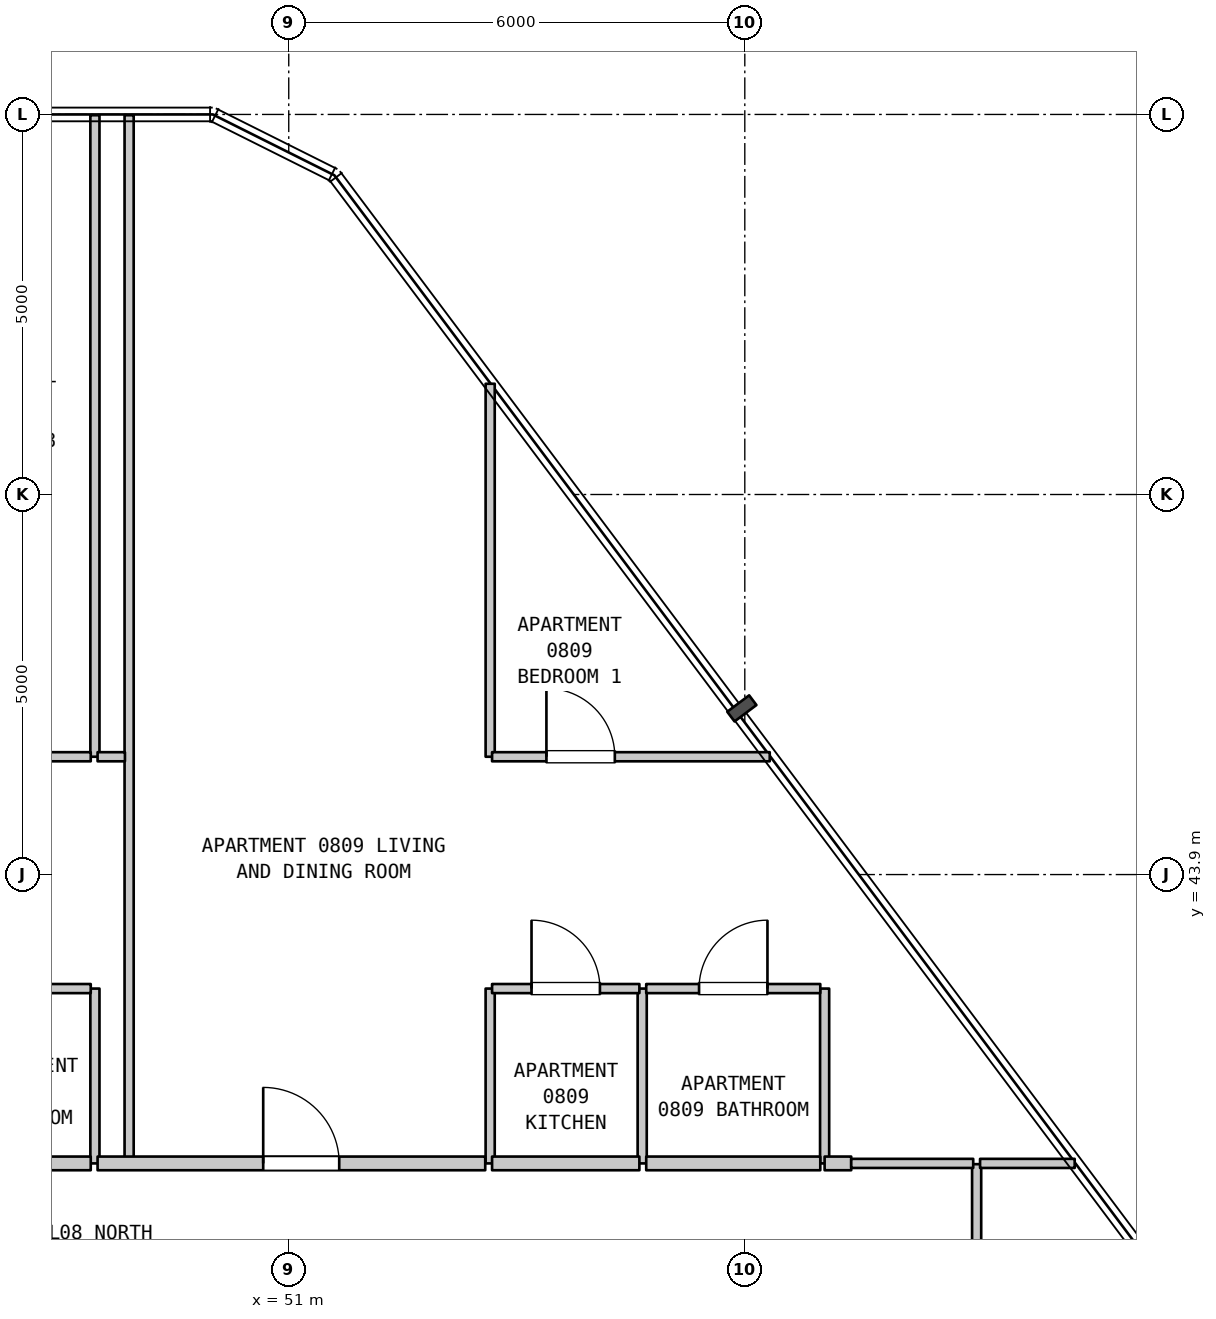
"""IFC4 building model, lengths in metres.
Left out: names, types, materials, properties, quantities, classifications, styles, units other than length and angle.
Written with IfcOpenShell. Run it as: python <this file> out.ifc"""

import sys

from ifc_helpers import new_model, si_unit, direction, frame, frame_2d, origin, place, context, subcontext, project, spatial, rectangle, extrude, element, fill, save


model = new_model("IFC4")
c1 = context("Model", 3, precision=1e-05, world=origin(), true_north=direction((0.0, 1.0)))
c2 = subcontext(c1, "Body", "Model", "MODEL_VIEW")
j1 = project(units=[si_unit("LENGTHUNIT", "METRE"), si_unit("PLANEANGLEUNIT", "RADIAN")], contexts=[c1])
p1 = place(None, origin())
s1 = spatial("IfcSite", under=j1, at=p1, CompositionType="ELEMENT")
p2 = place(p1, origin())
s2 = spatial("IfcBuilding", under=s1, at=p2, CompositionType="ELEMENT")
p3 = place(p2, frame((0.0, 0.0, 38.8)))
s3 = spatial("IfcBuildingStorey", under=s2, at=p3, CompositionType="ELEMENT", Elevation=38.8)
p4 = place(p3, frame((48.45, 40.1, 0.0), z_axis=(0.0, 0.0, 1.0), x_axis=(0.0, 1.0, 0.0)))
e1 = element("IfcWall", 1, at=p4, inside=s3, PredefinedType="PARTITIONING", context=c2, shape_type="SweptSolid", body=[
    extrude(rectangle(XDim=2.3, YDim=0.12, at=frame_2d((1.15, 0.0))), origin(), (0.0, 0.0, 1.0), 3.385),
])
p5 = place(p3, frame((48.45, 45.45, 0.0), z_axis=(0.0, 0.0, 1.0), x_axis=(0.0, 1.0, 0.0)))
e2 = element("IfcWall", 2, at=p5, inside=s3, PredefinedType="PARTITIONING", context=c2, shape_type="SweptSolid", body=[
    extrude(rectangle(XDim=8.44, YDim=0.12, at=frame_2d((4.22, 0.0))), origin(), (0.0, 0.0, 1.0), 3.385),
])
p6 = place(p3, frame((48.9, 40.1, 0.0), z_axis=(0.0, 0.0, 1.0), x_axis=(0.0, 1.0, 0.0)))
e3 = element("IfcWall", 3, at=p6, inside=s3, PredefinedType="PARTITIONING", context=c2, shape_type="SweptSolid", body=[
    extrude(rectangle(XDim=13.79, YDim=0.12, at=frame_2d((6.895, 0.0))), origin(), (0.0, 0.0, 1.0), 3.385),
])
p7 = place(p3, frame((53.65, 40.1, 0.0), z_axis=(0.0, 0.0, 1.0), x_axis=(0.0, 1.0, 0.0)))
e4 = element("IfcWall", 4, at=p7, inside=s3, PredefinedType="PARTITIONING", context=c2, shape_type="SweptSolid", body=[
    extrude(rectangle(XDim=2.3, YDim=0.12, at=frame_2d((1.15, 0.0))), origin(), (0.0, 0.0, 1.0), 3.385),
])
p8 = place(p3, frame((53.65, 45.45, 0.0), z_axis=(0.0, 0.0, 1.0), x_axis=(0.0, 1.0, 0.0)))
e5 = element("IfcWall", 5, at=p8, inside=s3, PredefinedType="PARTITIONING", context=c2, shape_type="SweptSolid", body=[
    extrude(rectangle(XDim=4.907, YDim=0.12, at=frame_2d((2.454, 0.0))), origin(), (0.0, 0.0, 1.0), 3.385),
])
for number, where, z_axis, x_axis in (
    (6, (55.65, 40.1, 0.0), (0.0, 0.0, 1.0), (0.0, 1.0, 0.0)),
    (7, (58.05, 40.1, 0.0), (0.0, 0.0, 1.0), (0.0, 1.0, 0.0)),
):
    element("IfcWall", number, at=place(p3, frame(where, z_axis=z_axis, x_axis=x_axis)), inside=s3, PredefinedType="PARTITIONING", context=c2, shape_type="SweptSolid", body=[
        extrude(rectangle(XDim=2.3, YDim=0.12, at=frame_2d((1.15, 0.0))), origin(), (0.0, 0.0, 1.0), 3.385),
    ])
p9 = place(p3, frame((60.05, 37.89, 0.0), z_axis=(0.0, 0.0, 1.0), x_axis=(0.0, 1.0, 0.0)))
e8 = element("IfcWall", 8, at=p9, inside=s3, PredefinedType="PARTITIONING", context=c2, shape_type="SweptSolid", body=[
    extrude(rectangle(XDim=2.2, YDim=0.12, at=frame_2d((1.1, 0.0))), origin(), (0.0, 0.0, 1.0), 3.385),
])
p10 = place(p3, frame((44.635, 40.1, 0.0), z_axis=(0.0, 0.0, 1.0), x_axis=(1.0, 0.0, 0.0)))
e9 = element("IfcWall", 9, at=p10, inside=s3, PredefinedType="STANDARD", context=c2, shape_type="SweptSolid", body=[
    extrude(rectangle(XDim=3.76, YDim=0.18, at=frame_2d((1.88, 0.0))), origin(), (0.0, 0.0, 1.0), 3.385),
])
p11 = place(p3, frame((48.485, 40.1, 0.0), z_axis=(0.0, 0.0, 1.0), x_axis=(1.0, 0.0, 0.0)))
e10 = element("IfcWall", 10, at=p11, inside=s3, PredefinedType="STANDARD", context=c2, shape_type="SweptSolid", body=[
    extrude(rectangle(XDim=5.1, YDim=0.18, at=frame_2d((2.55, 0.0))), origin(), (0.0, 0.0, 1.0), 3.385),
])
p12 = place(p11, frame((2.179, 0.0, 0.0)))
e11 = element("IfcOpeningElement", 11, at=p12, cuts=e10, PredefinedType="OPENING", context=c2, shape_type="SweptSolid", body=[
    extrude(rectangle(XDim=1.0, YDim=2.15, at=frame_2d((0.5, 1.075))), frame((0.0, 0.1, 0.0), z_axis=(0.0, -1.0, 0.0), x_axis=(1.0, 0.0, 0.0)), (0.0, 0.0, 1.0), 0.2),
])
p13 = place(p3, frame((53.675, 40.1, 0.0), z_axis=(0.0, 0.0, 1.0), x_axis=(1.0, 0.0, 0.0)))
e12 = element("IfcWall", 12, at=p13, inside=s3, PredefinedType="STANDARD", context=c2, shape_type="SweptSolid", body=[
    extrude(rectangle(XDim=1.938, YDim=0.18, at=frame_2d((0.969, 0.0))), origin(), (0.0, 0.0, 1.0), 3.385),
])
p14 = place(p3, frame((55.703, 40.1, 0.0), z_axis=(0.0, 0.0, 1.0), x_axis=(1.0, 0.0, 0.0)))
e13 = element("IfcWall", 13, at=p14, inside=s3, PredefinedType="STANDARD", context=c2, shape_type="SweptSolid", body=[
    extrude(rectangle(XDim=2.29, YDim=0.18, at=frame_2d((1.145, 0.0))), origin(), (0.0, 0.0, 1.0), 3.385),
])
p15 = place(p3, frame((58.05, 40.1, 0.0), z_axis=(0.0, 0.0, 1.0), x_axis=(1.0, 0.0, 0.0)))
e14 = element("IfcWall", 14, at=p15, inside=s3, PredefinedType="STANDARD", context=c2, shape_type="SweptSolid", body=[
    extrude(rectangle(XDim=0.35, YDim=0.18, at=frame_2d((0.175, 0.0))), origin(), (0.0, 0.0, 1.0), 3.385),
])
p16 = place(p3, frame((58.4, 40.1, 0.0), z_axis=(0.0, 0.0, 1.0), x_axis=(1.0, 0.0, 0.0)))
e15 = element("IfcWall", 15, at=p16, inside=s3, PredefinedType="PARTITIONING", context=c2, shape_type="SweptSolid", body=[
    extrude(rectangle(XDim=1.605, YDim=0.12, at=frame_2d((0.802, 0.0))), origin(), (0.0, 0.0, 1.0), 3.385),
])
p17 = place(p3, frame((60.095, 40.1, 0.0), z_axis=(0.0, 0.0, 1.0), x_axis=(1.0, 0.0, 0.0)))
e16 = element("IfcWall", 16, at=p17, inside=s3, PredefinedType="PARTITIONING", context=c2, shape_type="SweptSolid", body=[
    extrude(rectangle(XDim=1.245, YDim=0.12, at=frame_2d((0.623, 0.0))), origin(), (0.0, 0.0, 1.0), 3.385),
])
p18 = place(p3, frame((44.635, 42.4, 0.0), z_axis=(0.0, 0.0, 1.0), x_axis=(1.0, 0.0, 0.0)))
e17 = element("IfcWall", 17, at=p18, inside=s3, PredefinedType="PARTITIONING", context=c2, shape_type="SweptSolid", body=[
    extrude(rectangle(XDim=3.76, YDim=0.12, at=frame_2d((1.88, 0.0))), origin(), (0.0, 0.0, 1.0), 3.385),
])
p19 = place(p18, frame((1.358, 0.0, 0.0)))
e18 = element("IfcOpeningElement", 18, at=p19, cuts=e17, PredefinedType="OPENING", context=c2, shape_type="SweptSolid", body=[
    extrude(rectangle(XDim=0.9, YDim=2.1, at=frame_2d((0.45, 1.05))), frame((0.0, 0.07, 0.0), z_axis=(0.0, -1.0, 0.0), x_axis=(1.0, 0.0, 0.0)), (0.0, 0.0, 1.0), 0.14),
])
p20 = place(p3, frame((53.675, 42.4, 0.0), z_axis=(0.0, 0.0, 1.0), x_axis=(1.0, 0.0, 0.0)))
e19 = element("IfcWall", 19, at=p20, inside=s3, PredefinedType="PARTITIONING", context=c2, shape_type="SweptSolid", body=[
    extrude(rectangle(XDim=1.938, YDim=0.12, at=frame_2d((0.969, 0.0))), origin(), (0.0, 0.0, 1.0), 3.385),
])
p21 = place(p20, frame((0.519, 0.0, 0.0)))
e20 = element("IfcOpeningElement", 20, at=p21, cuts=e19, PredefinedType="OPENING", context=c2, shape_type="SweptSolid", body=[
    extrude(rectangle(XDim=0.9, YDim=2.15, at=frame_2d((0.45, 1.075))), frame((0.0, 0.07, 0.0), z_axis=(0.0, -1.0, 0.0), x_axis=(1.0, 0.0, 0.0)), (0.0, 0.0, 1.0), 0.14),
])
p22 = place(p3, frame((55.703, 42.4, 0.0), z_axis=(0.0, 0.0, 1.0), x_axis=(1.0, 0.0, 0.0)))
e21 = element("IfcWall", 21, at=p22, inside=s3, PredefinedType="PARTITIONING", context=c2, shape_type="SweptSolid", body=[
    extrude(rectangle(XDim=2.29, YDim=0.12, at=frame_2d((1.145, 0.0))), origin(), (0.0, 0.0, 1.0), 3.385),
])
p23 = place(p22, frame((0.695, 0.0, 0.0)))
e22 = element("IfcOpeningElement", 22, at=p23, cuts=e21, PredefinedType="OPENING", context=c2, shape_type="SweptSolid", body=[
    extrude(rectangle(XDim=0.9, YDim=2.1, at=frame_2d((0.45, 1.05))), frame((0.0, 0.07, 0.0), z_axis=(0.0, -1.0, 0.0), x_axis=(1.0, 0.0, 0.0)), (0.0, 0.0, 1.0), 0.14),
])
p24 = place(p3, frame((41.355, 45.45, 0.0), z_axis=(0.0, 0.0, 1.0), x_axis=(1.0, 0.0, 0.0)))
e23 = element("IfcWall", 23, at=p24, inside=s3, PredefinedType="PARTITIONING", context=c2, shape_type="SweptSolid", body=[
    extrude(rectangle(XDim=7.04, YDim=0.12, at=frame_2d((3.52, 0.0))), origin(), (0.0, 0.0, 1.0), 3.385),
])
p25 = place(p24, frame((0.868, 0.0, 0.0)))
e24 = element("IfcOpeningElement", 24, at=p25, cuts=e23, PredefinedType="OPENING", context=c2, shape_type="SweptSolid", body=[
    extrude(rectangle(XDim=0.9, YDim=2.15, at=frame_2d((0.45, 1.075))), frame((0.0, 0.07, 0.0), z_axis=(0.0, -1.0, 0.0), x_axis=(1.0, 0.0, 0.0)), (0.0, 0.0, 1.0), 0.14),
])
p26 = place(p24, frame((2.999, 0.0, 0.0)))
e25 = element("IfcOpeningElement", 25, at=p26, cuts=e23, PredefinedType="OPENING", context=c2, shape_type="SweptSolid", body=[
    extrude(rectangle(XDim=0.9, YDim=2.15, at=frame_2d((0.45, 1.075))), frame((0.0, 0.07, 0.0), z_axis=(0.0, -1.0, 0.0), x_axis=(1.0, 0.0, 0.0)), (0.0, 0.0, 1.0), 0.14),
])
p27 = place(p24, frame((5.272, 0.0, 0.0)))
e26 = element("IfcOpeningElement", 26, at=p27, cuts=e23, PredefinedType="OPENING", context=c2, shape_type="SweptSolid", body=[
    extrude(rectangle(XDim=0.9, YDim=2.15, at=frame_2d((0.45, 1.075))), frame((0.0, 0.07, 0.0), z_axis=(0.0, -1.0, 0.0), x_axis=(1.0, 0.0, 0.0)), (0.0, 0.0, 1.0), 0.14),
])
p28 = place(p3, frame((48.485, 45.45, 0.0), z_axis=(0.0, 0.0, 1.0), x_axis=(1.0, 0.0, 0.0)))
e27 = element("IfcWall", 27, at=p28, inside=s3, PredefinedType="PARTITIONING", context=c2, shape_type="SweptSolid", body=[
    extrude(rectangle(XDim=0.36, YDim=0.12, at=frame_2d((0.18, 0.0))), origin(), (0.0, 0.0, 1.0), 3.385),
])
p29 = place(p3, frame((53.675, 45.45, 0.0), z_axis=(0.0, 0.0, 1.0), x_axis=(1.0, 0.0, 0.0)))
e28 = element("IfcWall", 28, at=p29, inside=s3, PredefinedType="PARTITIONING", context=c2, shape_type="SweptSolid", body=[
    extrude(rectangle(XDim=3.653, YDim=0.12, at=frame_2d((1.826, 0.0))), origin(), (0.0, 0.0, 1.0), 3.385),
])
p30 = place(p29, frame((0.715, 0.0, 0.0)))
e29 = element("IfcOpeningElement", 29, at=p30, cuts=e28, PredefinedType="OPENING", context=c2, shape_type="SweptSolid", body=[
    extrude(rectangle(XDim=0.9, YDim=2.15, at=frame_2d((0.45, 1.075))), frame((0.0, 0.07, 0.0), z_axis=(0.0, -1.0, 0.0), x_axis=(1.0, 0.0, 0.0)), (0.0, 0.0, 1.0), 0.14),
])
p31 = place(p12, origin())
e30 = element("IfcDoor", 30, at=p31, inside=s3, OperationType="SINGLE_SWING_LEFT", PredefinedType="DOOR", context=c2, shape_type="SweptSolid", body=[
    extrude(rectangle(XDim=1.0, YDim=2.15, at=frame_2d((0.5, 1.075))), frame((0.0, 0.025, 0.0), z_axis=(0.0, -1.0, 0.0), x_axis=(1.0, 0.0, 0.0)), (0.0, 0.0, 1.0), 0.05),
])
fill(e11, e30)
p32 = place(p21, origin())
e31 = element("IfcDoor", 31, at=p32, inside=s3, OperationType="SINGLE_SWING_LEFT", PredefinedType="DOOR", context=c2, shape_type="SweptSolid", body=[
    extrude(rectangle(XDim=0.9, YDim=2.15, at=frame_2d((0.45, 1.075))), frame((0.0, 0.025, 0.0), z_axis=(0.0, -1.0, 0.0), x_axis=(1.0, 0.0, 0.0)), (0.0, 0.0, 1.0), 0.05),
])
fill(e20, e31)
p33 = place(p23, origin())
e32 = element("IfcDoor", 32, at=p33, inside=s3, OperationType="SINGLE_SWING_RIGHT", PredefinedType="DOOR", context=c2, shape_type="SweptSolid", body=[
    extrude(rectangle(XDim=0.9, YDim=2.1, at=frame_2d((0.45, 1.05))), frame((0.0, 0.025, 0.0), z_axis=(0.0, -1.0, 0.0), x_axis=(1.0, 0.0, 0.0)), (0.0, 0.0, 1.0), 0.05),
])
fill(e22, e32)
p34 = place(p30, origin())
e33 = element("IfcDoor", 33, at=p34, inside=s3, OperationType="SINGLE_SWING_LEFT", PredefinedType="DOOR", context=c2, shape_type="SweptSolid", body=[
    extrude(rectangle(XDim=0.9, YDim=2.15, at=frame_2d((0.45, 1.075))), frame((0.0, 0.025, 0.0), z_axis=(0.0, -1.0, 0.0), x_axis=(1.0, 0.0, 0.0)), (0.0, 0.0, 1.0), 0.05),
])
fill(e29, e33)
save(model, sys.argv[1])
